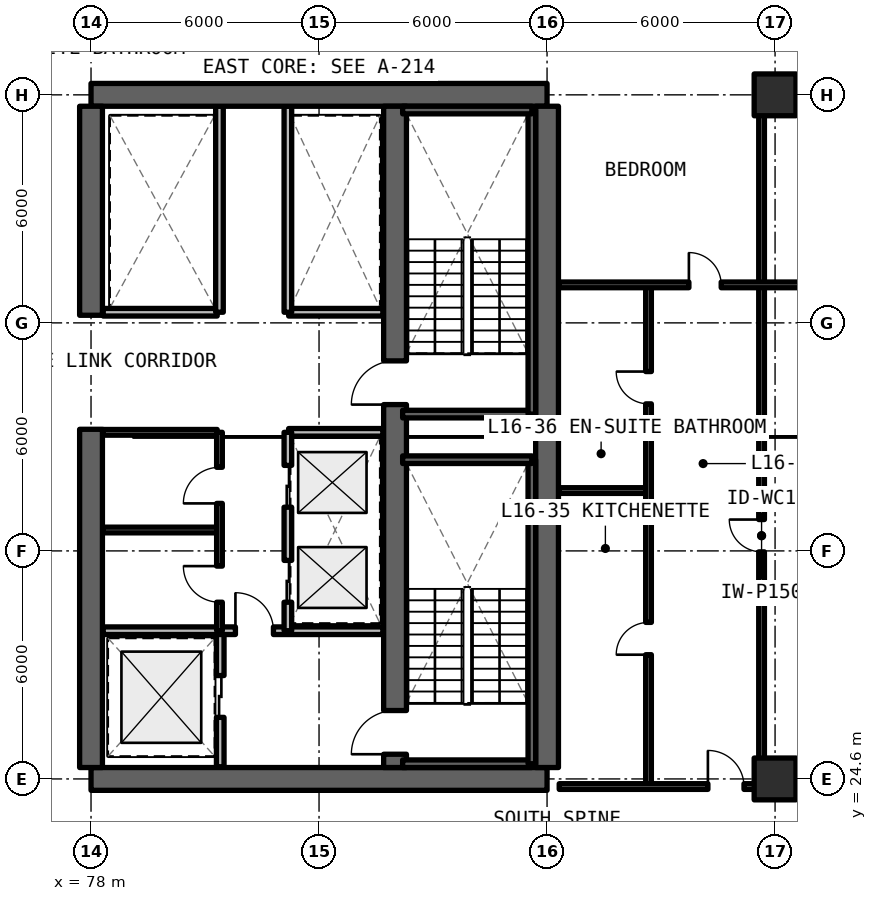
"""IFC4 building model, lengths in metres.
Left out: names, types, materials, properties, quantities, classifications, styles, units other than length and angle.
Written with IfcOpenShell. Run it as: python <this file> out.ifc"""

import sys

from ifc_helpers import new_model, si_unit, direction, frame, frame_2d, origin, origin_2d, place, context, subcontext, project, spatial, rectangle, extrude, element, fill, save


model = new_model("IFC4")
c1 = context("Model", 3, precision=1e-05, world=origin(), true_north=direction((0.0, 1.0)))
c2 = subcontext(c1, "Body", "Model", "MODEL_VIEW")
j1 = project(units=[si_unit("LENGTHUNIT", "METRE"), si_unit("PLANEANGLEUNIT", "RADIAN")], contexts=[c1])
p1 = place(None, origin())
s1 = spatial("IfcSite", under=j1, at=p1, CompositionType="ELEMENT")
p2 = place(p1, origin())
s2 = spatial("IfcBuilding", under=s1, at=p2, CompositionType="ELEMENT")
p3 = place(p2, frame((0.0, 0.0, 58.74)))
s3 = spatial("IfcBuildingStorey", under=s2, at=p3, CompositionType="ELEMENT", Elevation=58.74)
for number, where, z_axis, x_axis in (
    (1, (78.0, 24.6, 0.0), (0.0, 0.0, 1.0), (1.0, 0.0, 0.0)),
    (2, (90.0, 42.6, 0.0), (0.0, 0.0, 1.0), (-1.0, 0.0, 0.0)),
):
    element("IfcWall", number, at=place(p3, frame(where, z_axis=z_axis, x_axis=x_axis)), inside=s3, PredefinedType="SHEAR", context=c2, shape_type="SweptSolid", body=[
        extrude(rectangle(XDim=12.0, YDim=0.6, at=frame_2d((6.0, 0.0))), origin(), (0.0, 0.0, 1.0), 3.63),
    ])
p4 = place(p3, frame((90.0, 24.9, 0.0), z_axis=(0.0, 0.0, 1.0), x_axis=(0.0, 1.0, 0.0)))
e3 = element("IfcWall", 3, at=p4, inside=s3, PredefinedType="SHEAR", context=c2, shape_type="SweptSolid", body=[
    extrude(rectangle(XDim=17.4, YDim=0.6, at=frame_2d((8.7, 0.0))), origin(), (0.0, 0.0, 1.0), 3.63),
])
p5 = place(p3, frame((78.0, 24.9, 0.0), z_axis=(0.0, 0.0, 1.0), x_axis=(0.0, 1.0, 0.0)))
e4 = element("IfcWall", 4, at=p5, inside=s3, PredefinedType="SHEAR", context=c2, shape_type="SweptSolid", body=[
    extrude(rectangle(XDim=8.9, YDim=0.6, at=frame_2d((4.45, 0.0))), origin(), (0.0, 0.0, 1.0), 3.63),
])
p6 = place(p3, frame((78.0, 36.8, 0.0), z_axis=(0.0, 0.0, 1.0), x_axis=(0.0, 1.0, 0.0)))
e5 = element("IfcWall", 5, at=p6, inside=s3, PredefinedType="SHEAR", context=c2, shape_type="SweptSolid", body=[
    extrude(rectangle(XDim=5.5, YDim=0.6, at=frame_2d((2.75, 0.0))), origin(), (0.0, 0.0, 1.0), 3.63),
])
p7 = place(p3, frame((86.0, 24.9, 0.0), z_axis=(0.0, 0.0, 1.0), x_axis=(0.0, 1.0, 0.0)))
e6 = element("IfcWall", 6, at=p7, inside=s3, PredefinedType="SHEAR", context=c2, shape_type="SweptSolid", body=[
    extrude(rectangle(XDim=17.4, YDim=0.6, at=frame_2d((8.7, 0.0))), origin(), (0.0, 0.0, 1.0), 3.63),
])
p8 = place(p7, frame((0.35, 0.0, 0.0)))
e7 = element("IfcOpeningElement", 7, at=p8, cuts=e6, PredefinedType="OPENING", context=c2, shape_type="SweptSolid", body=[
    extrude(rectangle(XDim=1.15, YDim=2.15, at=frame_2d((0.575, 1.075))), frame((0.0, 0.31, 0.0), z_axis=(0.0, -1.0, 0.0), x_axis=(1.0, 0.0, 0.0)), (0.0, 0.0, 1.0), 0.62),
])
p9 = place(p7, frame((9.55, 0.0, 0.0)))
e8 = element("IfcOpeningElement", 8, at=p9, cuts=e6, PredefinedType="OPENING", context=c2, shape_type="SweptSolid", body=[
    extrude(rectangle(XDim=1.15, YDim=2.15, at=frame_2d((0.575, 1.075))), frame((0.0, 0.31, 0.0), z_axis=(0.0, -1.0, 0.0), x_axis=(1.0, 0.0, 0.0)), (0.0, 0.0, 1.0), 0.62),
])
for number, where, z_axis, x_axis in (
    (9, (96.0, 24.6, 0.0), (0.0, 0.0, 1.0), (1.0, 0.0, 0.0)),
    (10, (96.0, 42.6, 0.0), (0.0, 0.0, 1.0), (1.0, 0.0, 0.0)),
):
    element("IfcColumn", number, at=place(p3, frame(where, z_axis=z_axis, x_axis=x_axis)), inside=s3, PredefinedType="COLUMN", context=c2, shape_type="SweptSolid", body=[
        extrude(rectangle(XDim=1.1, YDim=1.1, at=origin_2d()), origin(), (0.0, 0.0, 1.0), 3.63),
    ])
p10 = place(p3, frame((81.4, 24.92, 0.0), z_axis=(0.0, 0.0, 1.0), x_axis=(0.0, 1.0, 0.0)))
e11 = element("IfcWall", 11, at=p10, inside=s3, PredefinedType="SOLIDWALL", context=c2, shape_type="SweptSolid", body=[
    extrude(rectangle(XDim=3.58, YDim=0.2, at=frame_2d((1.79, 0.0))), origin(), (0.0, 0.0, 1.0), 2.63),
])
p11 = place(p10, frame((1.3, 0.0, 0.0)))
e12 = element("IfcOpeningElement", 12, at=p11, cuts=e11, PredefinedType="OPENING", context=c2, shape_type="SweptSolid", body=[
    extrude(rectangle(XDim=1.1, YDim=2.2, at=frame_2d((0.55, 1.1))), frame((0.0, 0.11, 0.0), z_axis=(0.0, -1.0, 0.0), x_axis=(1.0, 0.0, 0.0)), (0.0, 0.0, 1.0), 0.22),
])
p12 = place(p3, frame((78.32, 28.5, 0.0), z_axis=(0.0, 0.0, 1.0), x_axis=(1.0, 0.0, 0.0)))
e13 = element("IfcWall", 13, at=p12, inside=s3, PredefinedType="SOLIDWALL", context=c2, shape_type="SweptSolid", body=[
    extrude(rectangle(XDim=7.36, YDim=0.2, at=frame_2d((3.68, 0.0))), origin(), (0.0, 0.0, 1.0), 2.63),
])
p13 = place(p12, frame((3.48, 0.0, 0.0)))
e14 = element("IfcOpeningElement", 14, at=p13, cuts=e13, PredefinedType="OPENING", context=c2, shape_type="SweptSolid", body=[
    extrude(rectangle(XDim=1.0, YDim=2.15, at=frame_2d((0.5, 1.075))), frame((0.0, 0.11, 0.0), z_axis=(0.0, -1.0, 0.0), x_axis=(1.0, 0.0, 0.0)), (0.0, 0.0, 1.0), 0.22),
])
p14 = place(p3, frame((83.2, 33.72, 0.0), z_axis=(0.0, 0.0, 1.0), x_axis=(1.0, 0.0, 0.0)))
e15 = element("IfcWall", 15, at=p14, inside=s3, PredefinedType="SOLIDWALL", context=c2, shape_type="SweptSolid", body=[
    extrude(rectangle(XDim=2.48, YDim=0.2, at=frame_2d((1.24, 0.0))), origin(), (0.0, 0.0, 1.0), 2.63),
])
p15 = place(p3, frame((83.18, 28.5, 0.0), z_axis=(0.0, 0.0, 1.0), x_axis=(0.0, 1.0, 0.0)))
e16 = element("IfcWall", 16, at=p15, inside=s3, PredefinedType="SOLIDWALL", context=c2, shape_type="SweptSolid", body=[
    extrude(rectangle(XDim=5.22, YDim=0.2, at=frame_2d((2.61, 0.0))), origin(), (0.0, 0.0, 1.0), 2.63),
])
p16 = place(p15, frame((0.75, 0.0, 0.0)))
e17 = element("IfcOpeningElement", 17, at=p16, cuts=e16, PredefinedType="OPENING", context=c2, shape_type="SweptSolid", body=[
    extrude(rectangle(XDim=1.1, YDim=2.2, at=frame_2d((0.55, 1.1))), frame((0.0, 0.11, 0.0), z_axis=(0.0, -1.0, 0.0), x_axis=(1.0, 0.0, 0.0)), (0.0, 0.0, 1.0), 0.22),
])
p17 = place(p15, frame((3.25, 0.0, 0.0)))
e18 = element("IfcOpeningElement", 18, at=p17, cuts=e16, PredefinedType="OPENING", context=c2, shape_type="SweptSolid", body=[
    extrude(rectangle(XDim=1.1, YDim=2.2, at=frame_2d((0.55, 1.1))), frame((0.0, 0.11, 0.0), z_axis=(0.0, -1.0, 0.0), x_axis=(1.0, 0.0, 0.0)), (0.0, 0.0, 1.0), 0.22),
])
for number, where, z_axis, x_axis in (
    (19, (78.32, 31.15, 0.0), (0.0, 0.0, 1.0), (1.0, 0.0, 0.0)),
    (20, (78.32, 33.72, 0.0), (0.0, 0.0, 1.0), (1.0, 0.0, 0.0)),
):
    element("IfcWall", number, at=place(p3, frame(where, z_axis=z_axis, x_axis=x_axis)), inside=s3, PredefinedType="SOLIDWALL", context=c2, shape_type="SweptSolid", body=[
        extrude(rectangle(XDim=3.0, YDim=0.15, at=frame_2d((1.5, 0.0))), origin(), (0.0, 0.0, 1.0), 2.63),
    ])
p18 = place(p3, frame((81.38, 28.5, 0.0), z_axis=(0.0, 0.0, 1.0), x_axis=(0.0, 1.0, 0.0)))
e21 = element("IfcWall", 21, at=p18, inside=s3, PredefinedType="SOLIDWALL", context=c2, shape_type="SweptSolid", body=[
    extrude(rectangle(XDim=5.22, YDim=0.15, at=frame_2d((2.61, 0.0))), origin(), (0.0, 0.0, 1.0), 2.63),
])
p19 = place(p18, frame((0.75, 0.0, 0.0)))
e22 = element("IfcOpeningElement", 22, at=p19, cuts=e21, PredefinedType="OPENING", context=c2, shape_type="SweptSolid", body=[
    extrude(rectangle(XDim=0.95, YDim=2.15, at=frame_2d((0.475, 1.075))), frame((0.0, 0.085, 0.0), z_axis=(0.0, -1.0, 0.0), x_axis=(1.0, 0.0, 0.0)), (0.0, 0.0, 1.0), 0.17),
])
p20 = place(p18, frame((3.35, 0.0, 0.0)))
e23 = element("IfcOpeningElement", 23, at=p20, cuts=e21, PredefinedType="OPENING", context=c2, shape_type="SweptSolid", body=[
    extrude(rectangle(XDim=0.95, YDim=2.15, at=frame_2d((0.475, 1.075))), frame((0.0, 0.085, 0.0), z_axis=(0.0, -1.0, 0.0), x_axis=(1.0, 0.0, 0.0)), (0.0, 0.0, 1.0), 0.17),
])
p21 = place(p3, frame((83.2, 36.88, 0.0), z_axis=(0.0, 0.0, 1.0), x_axis=(1.0, 0.0, 0.0)))
e24 = element("IfcWall", 24, at=p21, inside=s3, PredefinedType="SOLIDWALL", context=c2, shape_type="SweptSolid", body=[
    extrude(rectangle(XDim=2.48, YDim=0.2, at=frame_2d((1.24, 0.0))), origin(), (0.0, 0.0, 1.0), 2.63),
])
p22 = place(p3, frame((83.18, 36.88, 0.0), z_axis=(0.0, 0.0, 1.0), x_axis=(0.0, 1.0, 0.0)))
e25 = element("IfcWall", 25, at=p22, inside=s3, PredefinedType="SOLIDWALL", context=c2, shape_type="SweptSolid", body=[
    extrude(rectangle(XDim=5.42, YDim=0.2, at=frame_2d((2.71, 0.0))), origin(), (0.0, 0.0, 1.0), 2.63),
])
p23 = place(p3, frame((78.32, 36.88, 0.0), z_axis=(0.0, 0.0, 1.0), x_axis=(1.0, 0.0, 0.0)))
e26 = element("IfcWall", 26, at=p23, inside=s3, PredefinedType="SOLIDWALL", context=c2, shape_type="SweptSolid", body=[
    extrude(rectangle(XDim=3.0, YDim=0.2, at=frame_2d((1.5, 0.0))), origin(), (0.0, 0.0, 1.0), 2.63),
])
p24 = place(p3, frame((81.38, 36.88, 0.0), z_axis=(0.0, 0.0, 1.0), x_axis=(0.0, 1.0, 0.0)))
e27 = element("IfcWall", 27, at=p24, inside=s3, PredefinedType="SOLIDWALL", context=c2, shape_type="SweptSolid", body=[
    extrude(rectangle(XDim=5.42, YDim=0.2, at=frame_2d((2.71, 0.0))), origin(), (0.0, 0.0, 1.0), 2.63),
])
p25 = place(p3, frame((95.645, 24.4, 0.0), z_axis=(0.0, 0.0, 1.0), x_axis=(0.0, 1.0, 0.0)))
e28 = element("IfcWall", 28, at=p25, inside=s3, PredefinedType="PARTITIONING", context=c2, shape_type="SweptSolid", body=[
    extrude(rectangle(XDim=13.2, YDim=0.15, at=frame_2d((6.6, 0.0))), origin(), (0.0, 0.0, 1.0), 2.63),
])
p26 = place(p25, frame((6.175, 0.0, 0.0)))
e29 = element("IfcOpeningElement", 29, at=p26, cuts=e28, PredefinedType="OPENING", context=c2, shape_type="SweptSolid", body=[
    extrude(rectangle(XDim=0.85, YDim=2.1, at=frame_2d((0.425, 1.05))), frame((0.0, 0.085, 0.0), z_axis=(0.0, -1.0, 0.0), x_axis=(1.0, 0.0, 0.0)), (0.0, 0.0, 1.0), 0.17),
])
p27 = place(p3, frame((90.32, 32.188, 0.0), z_axis=(0.0, 0.0, 1.0), x_axis=(1.0, 0.0, 0.0)))
e30 = element("IfcWall", 30, at=p27, inside=s3, PredefinedType="PARTITIONING", context=c2, shape_type="SweptSolid", body=[
    extrude(rectangle(XDim=2.35, YDim=0.15, at=frame_2d((1.175, 0.0))), origin(), (0.0, 0.0, 1.0), 2.63),
])
p28 = place(p3, frame((92.67, 24.4, 0.0), z_axis=(0.0, 0.0, 1.0), x_axis=(0.0, 1.0, 0.0)))
e31 = element("IfcWall", 31, at=p28, inside=s3, PredefinedType="PARTITIONING", context=c2, shape_type="SweptSolid", body=[
    extrude(rectangle(XDim=13.2, YDim=0.15, at=frame_2d((6.6, 0.0))), origin(), (0.0, 0.0, 1.0), 2.63),
])
p29 = place(p28, frame((3.469, 0.0, 0.0)))
e32 = element("IfcOpeningElement", 32, at=p29, cuts=e31, PredefinedType="OPENING", context=c2, shape_type="SweptSolid", body=[
    extrude(rectangle(XDim=0.85, YDim=2.1, at=frame_2d((0.425, 1.05))), frame((0.0, 0.085, 0.0), z_axis=(0.0, -1.0, 0.0), x_axis=(1.0, 0.0, 0.0)), (0.0, 0.0, 1.0), 0.17),
])
p30 = place(p28, frame((10.069, 0.0, 0.0)))
e33 = element("IfcOpeningElement", 33, at=p30, cuts=e31, PredefinedType="OPENING", context=c2, shape_type="SweptSolid", body=[
    extrude(rectangle(XDim=0.85, YDim=2.1, at=frame_2d((0.425, 1.05))), frame((0.0, 0.085, 0.0), z_axis=(0.0, -1.0, 0.0), x_axis=(1.0, 0.0, 0.0)), (0.0, 0.0, 1.0), 0.17),
])
p31 = place(p3, frame((95.645, 37.6, 0.0), z_axis=(0.0, 0.0, 1.0), x_axis=(0.0, 1.0, 0.0)))
e34 = element("IfcWall", 34, at=p31, inside=s3, PredefinedType="PARTITIONING", context=c2, shape_type="SweptSolid", body=[
    extrude(rectangle(XDim=5.2, YDim=0.15, at=frame_2d((2.6, 0.0))), origin(), (0.0, 0.0, 1.0), 2.63),
])
p32 = place(p3, frame((90.32, 37.6, 0.0), z_axis=(0.0, 0.0, 1.0), x_axis=(1.0, 0.0, 0.0)))
e35 = element("IfcWall", 35, at=p32, inside=s3, PredefinedType="PARTITIONING", context=c2, shape_type="SweptSolid", body=[
    extrude(rectangle(XDim=10.24, YDim=0.15, at=frame_2d((5.12, 0.0))), origin(), (0.0, 0.0, 1.0), 2.63),
])
p33 = place(p32, frame((3.412, 0.0, 0.0)))
e36 = element("IfcOpeningElement", 36, at=p33, cuts=e35, PredefinedType="OPENING", context=c2, shape_type="SweptSolid", body=[
    extrude(rectangle(XDim=0.85, YDim=2.1, at=frame_2d((0.425, 1.05))), frame((0.0, 0.085, 0.0), z_axis=(0.0, -1.0, 0.0), x_axis=(1.0, 0.0, 0.0)), (0.0, 0.0, 1.0), 0.17),
])
p34 = place(p32, frame((7.357, 0.0, 0.0)))
e37 = element("IfcOpeningElement", 37, at=p34, cuts=e35, PredefinedType="OPENING", context=c2, shape_type="SweptSolid", body=[
    extrude(rectangle(XDim=0.85, YDim=2.1, at=frame_2d((0.425, 1.05))), frame((0.0, 0.085, 0.0), z_axis=(0.0, -1.0, 0.0), x_axis=(1.0, 0.0, 0.0)), (0.0, 0.0, 1.0), 0.17),
])
p35 = place(p3, frame((90.32, 24.4, 0.0), z_axis=(0.0, 0.0, 1.0), x_axis=(1.0, 0.0, 0.0)))
e38 = element("IfcWall", 38, at=p35, inside=s3, PredefinedType="SOLIDWALL", context=c2, shape_type="SweptSolid", body=[
    extrude(rectangle(XDim=10.24, YDim=0.15, at=frame_2d((5.12, 0.0))), origin(), (0.0, 0.0, 1.0), 2.625),
])
p36 = place(p35, frame((3.913, 0.0, 0.0)))
e39 = element("IfcOpeningElement", 39, at=p36, cuts=e38, PredefinedType="OPENING", context=c2, shape_type="SweptSolid", body=[
    extrude(rectangle(XDim=0.95, YDim=2.15, at=frame_2d((0.475, 1.075))), frame((0.0, 0.085, 0.0), z_axis=(0.0, -1.0, 0.0), x_axis=(1.0, 0.0, 0.0)), (0.0, 0.0, 1.0), 0.17),
])
p37 = place(p3, frame((86.2, 25.0, 0.0), z_axis=(0.0, 0.0, 1.0), x_axis=(1.0, 0.0, 0.0)))
e40 = element("IfcWall", 40, at=p37, inside=s3, PredefinedType="SOLIDWALL", context=c2, shape_type="SweptSolid", body=[
    extrude(rectangle(XDim=3.4, YDim=0.2, at=frame_2d((1.7, 0.0))), origin(), (0.0, 0.0, 1.0), 3.63),
])
p38 = place(p3, frame((89.6, 25.0, 0.0), z_axis=(0.0, 0.0, 1.0), x_axis=(0.0, 1.0, 0.0)))
e41 = element("IfcWall", 41, at=p38, inside=s3, PredefinedType="SOLIDWALL", context=c2, shape_type="SweptSolid", body=[
    extrude(rectangle(XDim=8.0, YDim=0.2, at=frame_2d((4.0, 0.0))), origin(), (0.0, 0.0, 1.0), 3.63),
])
for number, where, z_axis, x_axis in (
    (42, (89.6, 33.0, 0.0), (0.0, 0.0, 1.0), (-1.0, 0.0, 0.0)),
    (43, (86.2, 34.2, 0.0), (0.0, 0.0, 1.0), (1.0, 0.0, 0.0)),
):
    element("IfcWall", number, at=place(p3, frame(where, z_axis=z_axis, x_axis=x_axis)), inside=s3, PredefinedType="SOLIDWALL", context=c2, shape_type="SweptSolid", body=[
        extrude(rectangle(XDim=3.4, YDim=0.2, at=frame_2d((1.7, 0.0))), origin(), (0.0, 0.0, 1.0), 3.63),
    ])
p39 = place(p3, frame((89.6, 34.2, 0.0), z_axis=(0.0, 0.0, 1.0), x_axis=(0.0, 1.0, 0.0)))
e44 = element("IfcWall", 44, at=p39, inside=s3, PredefinedType="SOLIDWALL", context=c2, shape_type="SweptSolid", body=[
    extrude(rectangle(XDim=8.0, YDim=0.2, at=frame_2d((4.0, 0.0))), origin(), (0.0, 0.0, 1.0), 3.63),
])
p40 = place(p3, frame((89.6, 42.2, 0.0), z_axis=(0.0, 0.0, 1.0), x_axis=(-1.0, 0.0, 0.0)))
e45 = element("IfcWall", 45, at=p40, inside=s3, PredefinedType="SOLIDWALL", context=c2, shape_type="SweptSolid", body=[
    extrude(rectangle(XDim=3.4, YDim=0.2, at=frame_2d((1.7, 0.0))), origin(), (0.0, 0.0, 1.0), 3.63),
])
p41 = place(p11, origin())
e46 = element("IfcDoor", 46, at=p41, inside=s3, OperationType="SLIDING_TO_LEFT", PredefinedType="DOOR", context=c2, shape_type="SweptSolid", body=[
    extrude(rectangle(XDim=1.1, YDim=2.2, at=frame_2d((0.55, 1.1))), frame((0.0, 0.025, 0.0), z_axis=(0.0, -1.0, 0.0), x_axis=(1.0, 0.0, 0.0)), (0.0, 0.0, 1.0), 0.05),
])
fill(e12, e46)
p42 = place(p13, origin())
e47 = element("IfcDoor", 47, at=p42, inside=s3, OperationType="SINGLE_SWING_LEFT", PredefinedType="DOOR", context=c2, shape_type="SweptSolid", body=[
    extrude(rectangle(XDim=1.0, YDim=2.15, at=frame_2d((0.5, 1.075))), frame((0.0, 0.025, 0.0), z_axis=(0.0, -1.0, 0.0), x_axis=(1.0, 0.0, 0.0)), (0.0, 0.0, 1.0), 0.05),
])
fill(e14, e47)
p43 = place(p16, origin())
e48 = element("IfcDoor", 48, at=p43, inside=s3, OperationType="SLIDING_TO_LEFT", PredefinedType="DOOR", context=c2, shape_type="SweptSolid", body=[
    extrude(rectangle(XDim=1.1, YDim=2.2, at=frame_2d((0.55, 1.1))), frame((0.0, 0.025, 0.0), z_axis=(0.0, -1.0, 0.0), x_axis=(1.0, 0.0, 0.0)), (0.0, 0.0, 1.0), 0.05),
])
fill(e17, e48)
p44 = place(p17, origin())
e49 = element("IfcDoor", 49, at=p44, inside=s3, OperationType="SLIDING_TO_RIGHT", PredefinedType="DOOR", context=c2, shape_type="SweptSolid", body=[
    extrude(rectangle(XDim=1.1, YDim=2.2, at=frame_2d((0.55, 1.1))), frame((0.0, 0.025, 0.0), z_axis=(0.0, -1.0, 0.0), x_axis=(1.0, 0.0, 0.0)), (0.0, 0.0, 1.0), 0.05),
])
fill(e18, e49)
p45 = place(p19, origin())
e50 = element("IfcDoor", 50, at=p45, inside=s3, OperationType="SINGLE_SWING_RIGHT", PredefinedType="DOOR", context=c2, shape_type="SweptSolid", body=[
    extrude(rectangle(XDim=0.95, YDim=2.15, at=frame_2d((0.475, 1.075))), frame((0.0, 0.025, 0.0), z_axis=(0.0, -1.0, 0.0), x_axis=(1.0, 0.0, 0.0)), (0.0, 0.0, 1.0), 0.05),
])
fill(e22, e50)
p46 = place(p20, origin())
e51 = element("IfcDoor", 51, at=p46, inside=s3, OperationType="SINGLE_SWING_LEFT", PredefinedType="DOOR", context=c2, shape_type="SweptSolid", body=[
    extrude(rectangle(XDim=0.95, YDim=2.15, at=frame_2d((0.475, 1.075))), frame((0.0, 0.025, 0.0), z_axis=(0.0, -1.0, 0.0), x_axis=(1.0, 0.0, 0.0)), (0.0, 0.0, 1.0), 0.05),
])
fill(e23, e51)
p47 = place(p26, origin())
e52 = element("IfcDoor", 52, at=p47, inside=s3, OperationType="SINGLE_SWING_RIGHT", PredefinedType="DOOR", context=c2, shape_type="SweptSolid", body=[
    extrude(rectangle(XDim=0.85, YDim=2.1, at=frame_2d((0.425, 1.05))), frame((0.0, 0.025, 0.0), z_axis=(0.0, -1.0, 0.0), x_axis=(1.0, 0.0, 0.0)), (0.0, 0.0, 1.0), 0.05),
])
fill(e29, e52)
p48 = place(p29, origin())
e53 = element("IfcDoor", 53, at=p48, inside=s3, OperationType="SINGLE_SWING_LEFT", PredefinedType="DOOR", context=c2, shape_type="SweptSolid", body=[
    extrude(rectangle(XDim=0.85, YDim=2.1, at=frame_2d((0.425, 1.05))), frame((0.0, 0.025, 0.0), z_axis=(0.0, -1.0, 0.0), x_axis=(1.0, 0.0, 0.0)), (0.0, 0.0, 1.0), 0.05),
])
fill(e32, e53)
p49 = place(p30, origin())
e54 = element("IfcDoor", 54, at=p49, inside=s3, OperationType="SINGLE_SWING_RIGHT", PredefinedType="DOOR", context=c2, shape_type="SweptSolid", body=[
    extrude(rectangle(XDim=0.85, YDim=2.1, at=frame_2d((0.425, 1.05))), frame((0.0, 0.025, 0.0), z_axis=(0.0, -1.0, 0.0), x_axis=(1.0, 0.0, 0.0)), (0.0, 0.0, 1.0), 0.05),
])
fill(e33, e54)
p50 = place(p33, origin())
e55 = element("IfcDoor", 55, at=p50, inside=s3, OperationType="SINGLE_SWING_LEFT", PredefinedType="DOOR", context=c2, shape_type="SweptSolid", body=[
    extrude(rectangle(XDim=0.85, YDim=2.1, at=frame_2d((0.425, 1.05))), frame((0.0, 0.025, 0.0), z_axis=(0.0, -1.0, 0.0), x_axis=(1.0, 0.0, 0.0)), (0.0, 0.0, 1.0), 0.05),
])
fill(e36, e55)
p51 = place(p36, origin())
e56 = element("IfcDoor", 56, at=p51, inside=s3, OperationType="SINGLE_SWING_LEFT", PredefinedType="DOOR", context=c2, shape_type="SweptSolid", body=[
    extrude(rectangle(XDim=0.95, YDim=2.15, at=frame_2d((0.475, 1.075))), frame((0.0, 0.025, 0.0), z_axis=(0.0, -1.0, 0.0), x_axis=(1.0, 0.0, 0.0)), (0.0, 0.0, 1.0), 0.05),
])
fill(e39, e56)
p52 = place(p8, origin())
e57 = element("IfcDoor", 57, at=p52, inside=s3, OperationType="SINGLE_SWING_RIGHT", PredefinedType="DOOR", context=c2, shape_type="SweptSolid", body=[
    extrude(rectangle(XDim=1.15, YDim=2.15, at=frame_2d((0.575, 1.075))), frame((0.0, 0.025, 0.0), z_axis=(0.0, -1.0, 0.0), x_axis=(1.0, 0.0, 0.0)), (0.0, 0.0, 1.0), 0.05),
])
fill(e7, e57)
p53 = place(p9, origin())
e58 = element("IfcDoor", 58, at=p53, inside=s3, OperationType="SINGLE_SWING_LEFT", PredefinedType="DOOR", context=c2, shape_type="SweptSolid", body=[
    extrude(rectangle(XDim=1.15, YDim=2.15, at=frame_2d((0.575, 1.075))), frame((0.0, 0.025, 0.0), z_axis=(0.0, -1.0, 0.0), x_axis=(1.0, 0.0, 0.0)), (0.0, 0.0, 1.0), 0.05),
])
fill(e8, e58)
save(model, sys.argv[1])
